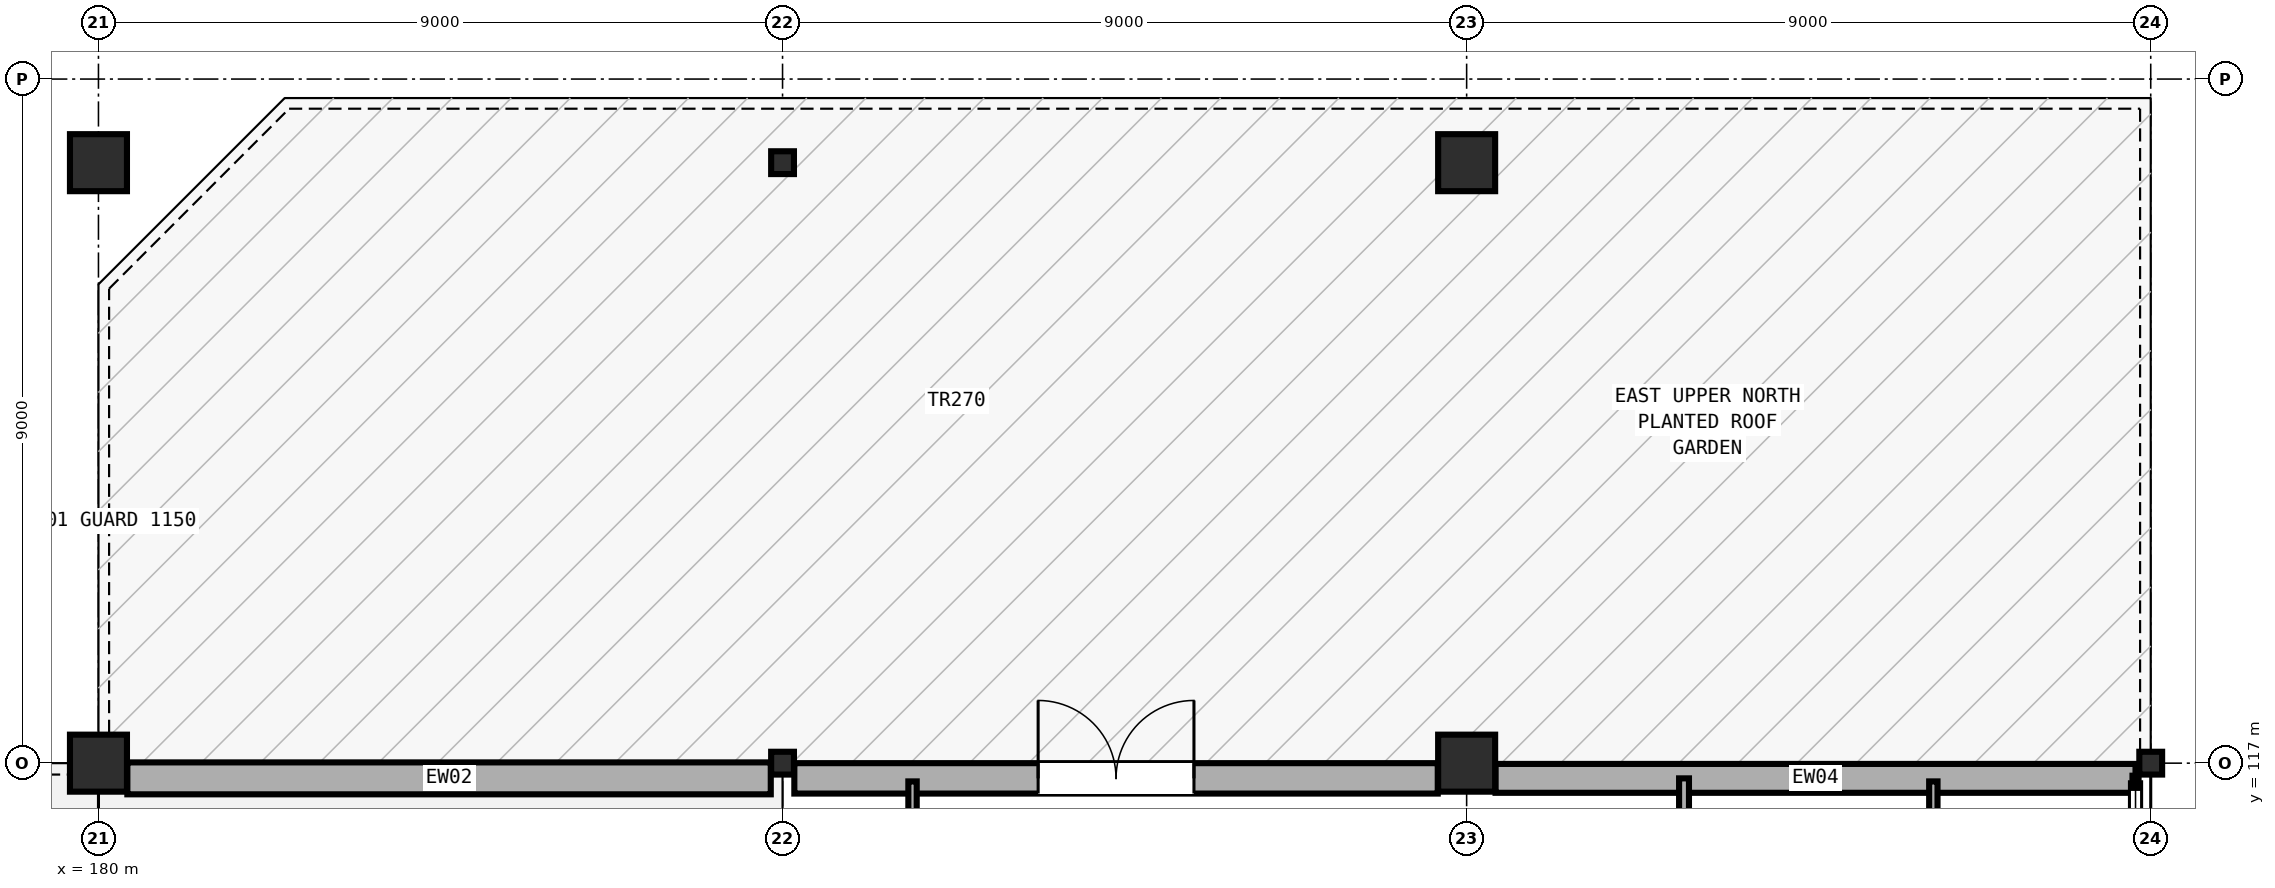
"""IFC4 building model, lengths in metres.
Left out: names, types, materials, properties, quantities, classifications, styles, units other than length and angle.
Written with IfcOpenShell. Run it as: python <this file> out.ifc"""

import sys

from ifc_helpers import new_model, si_unit, direction, frame, frame_2d, origin, origin_2d, place, context, subcontext, project, spatial, rectangle, hollow_rectangle, extrude, element, fill, save


model = new_model("IFC4")
c1 = context("Model", 3, precision=1e-05, world=origin(), true_north=direction((0.0, 1.0)))
c2 = subcontext(c1, "Body", "Model", "MODEL_VIEW")
j1 = project(units=[si_unit("LENGTHUNIT", "METRE"), si_unit("PLANEANGLEUNIT", "RADIAN")], contexts=[c1])
p1 = place(None, origin())
s1 = spatial("IfcSite", under=j1, at=p1, CompositionType="ELEMENT")
p2 = place(p1, origin())
s2 = spatial("IfcBuilding", under=s1, at=p2, CompositionType="ELEMENT")
p3 = place(p2, frame((0.0, 0.0, 19.2)))
s3 = spatial("IfcBuildingStorey", under=s2, at=p3, CompositionType="ELEMENT", Elevation=19.2)
for number, where, z_axis, x_axis in (
    (1, (180.0, 117.0, 0.0), (0.0, 0.0, 1.0), (1.0, 0.0, 0.0)),
    (2, (180.0, 124.9, 0.0), (0.0, 0.0, 1.0), (1.0, 0.0, 0.0)),
):
    element("IfcColumn", number, at=place(p3, frame(where, z_axis=z_axis, x_axis=x_axis)), inside=s3, PredefinedType="COLUMN", context=c2, shape_type="SweptSolid", body=[
        extrude(rectangle(XDim=0.75, YDim=0.75, at=origin_2d()), origin(), (0.0, 0.0, 1.0), 4.8),
    ])
for number, where, z_axis, x_axis in (
    (3, (189.0, 117.0, 0.0), (0.0, 0.0, 1.0), (1.0, 0.0, 0.0)),
    (4, (189.0, 124.9, 0.0), (0.0, 0.0, 1.0), (1.0, 0.0, 0.0)),
):
    element("IfcColumn", number, at=place(p3, frame(where, z_axis=z_axis, x_axis=x_axis)), inside=s3, PredefinedType="COLUMN", context=c2, shape_type="SweptSolid", body=[
        extrude(hollow_rectangle(XDim=0.3, YDim=0.3, WallThickness=0.012, at=origin_2d()), origin(), (0.0, 0.0, 1.0), 4.8),
    ])
for number, where, z_axis, x_axis in (
    (5, (198.0, 117.0, 0.0), (0.0, 0.0, 1.0), (1.0, 0.0, 0.0)),
    (6, (198.0, 124.9, 0.0), (0.0, 0.0, 1.0), (1.0, 0.0, 0.0)),
):
    element("IfcColumn", number, at=place(p3, frame(where, z_axis=z_axis, x_axis=x_axis)), inside=s3, PredefinedType="COLUMN", context=c2, shape_type="SweptSolid", body=[
        extrude(rectangle(XDim=0.75, YDim=0.75, at=origin_2d()), origin(), (0.0, 0.0, 1.0), 4.8),
    ])
p4 = place(p3, frame((207.0, 117.0, 0.0), z_axis=(0.0, 0.0, 1.0), x_axis=(1.0, 0.0, 0.0)))
e7 = element("IfcColumn", 7, at=p4, inside=s3, PredefinedType="COLUMN", context=c2, shape_type="SweptSolid", body=[
    extrude(hollow_rectangle(XDim=0.3, YDim=0.3, WallThickness=0.012, at=origin_2d()), origin(), (0.0, 0.0, 1.0), 4.8),
])
p5 = place(p3, frame((180.38, 116.8, 0.0), z_axis=(0.0, 0.0, 1.0), x_axis=(1.0, 0.0, 0.0)))
e8 = element("IfcWall", 8, at=p5, inside=s3, PredefinedType="SOLIDWALL", context=c2, shape_type="SweptSolid", body=[
    extrude(rectangle(XDim=8.465, YDim=0.42, at=frame_2d((4.232, 0.0))), origin(), (0.0, 0.0, 1.0), 3.28),
])
p6 = place(p3, frame((189.155, 116.8, 0.0), z_axis=(0.0, 0.0, 1.0), x_axis=(1.0, 0.0, 0.0)))
e9 = element("IfcWall", 9, at=p6, inside=s3, PredefinedType="SOLIDWALL", context=c2, shape_type="SweptSolid", body=[
    extrude(rectangle(XDim=8.465, YDim=0.4, at=frame_2d((4.232, 0.0))), origin(), (0.0, 0.0, 1.0), 3.58),
])
p7 = place(p6, frame((3.208, 0.0, 0.0)))
e10 = element("IfcOpeningElement", 10, at=p7, cuts=e9, PredefinedType="OPENING", context=c2, shape_type="SweptSolid", body=[
    extrude(rectangle(XDim=2.05, YDim=2.3, at=frame_2d((1.025, 1.15))), frame((0.0, 0.21, 0.0), z_axis=(0.0, -1.0, 0.0), x_axis=(1.0, 0.0, 0.0)), (0.0, 0.0, 1.0), 0.42),
])
p8 = place(p3, frame((198.38, 116.8, 0.0), z_axis=(0.0, 0.0, 1.0), x_axis=(1.0, 0.0, 0.0)))
e11 = element("IfcWall", 11, at=p8, inside=s3, PredefinedType="SOLIDWALL", context=c2, shape_type="SweptSolid", body=[
    extrude(rectangle(XDim=8.42, YDim=0.38, at=frame_2d((4.21, 0.0))), origin(), (0.0, 0.0, 1.0), 3.58),
])
p9 = place(p3, frame((200.86, 102.77, 0.0), z_axis=(0.0, 0.0, 1.0), x_axis=(0.0, 1.0, 0.0)))
e12 = element("IfcWall", 12, at=p9, inside=s3, PredefinedType="PARTITIONING", context=c2, shape_type="SweptSolid", body=[
    extrude(rectangle(XDim=14.03, YDim=0.13, at=frame_2d((7.015, 0.0))), origin(), (0.0, 0.0, 1.0), 3.28),
])
p10 = place(p9, frame((6.44, 0.0, 0.0)))
e13 = element("IfcOpeningElement", 13, at=p10, cuts=e12, PredefinedType="OPENING", context=c2, shape_type="SweptSolid", body=[
    extrude(rectangle(XDim=1.15, YDim=2.15, at=frame_2d((0.575, 1.075))), frame((0.0, 0.075, 0.0), z_axis=(0.0, -1.0, 0.0), x_axis=(1.0, 0.0, 0.0)), (0.0, 0.0, 1.0), 0.15),
])
p11 = place(p3, frame((190.71, 108.802, 0.0), z_axis=(0.0, 0.0, 1.0), x_axis=(0.0, 1.0, 0.0)))
e14 = element("IfcWall", 14, at=p11, inside=s3, PredefinedType="PARTITIONING", context=c2, shape_type="SweptSolid", body=[
    extrude(rectangle(XDim=7.958, YDim=0.11, at=frame_2d((3.979, 0.0))), origin(), (0.0, 0.0, 1.0), 3.28),
])
p12 = place(p3, frame((204.14, 102.81, 0.0), z_axis=(0.0, 0.0, 1.0), x_axis=(0.0, 1.0, 0.0)))
e15 = element("IfcWall", 15, at=p12, inside=s3, PredefinedType="PARTITIONING", context=c2, shape_type="SweptSolid", body=[
    extrude(rectangle(XDim=13.95, YDim=0.11, at=frame_2d((6.975, 0.0))), origin(), (0.0, 0.0, 1.0), 3.28),
])
p13 = place(p7, origin())
e16 = element("IfcDoor", 16, at=p13, inside=s3, OperationType="DOUBLE_DOOR_SINGLE_SWING", PredefinedType="DOOR", context=c2, shape_type="SweptSolid", body=[
    extrude(rectangle(XDim=2.05, YDim=2.3, at=frame_2d((1.025, 1.15))), frame((0.0, 0.025, 0.0), z_axis=(0.0, -1.0, 0.0), x_axis=(1.0, 0.0, 0.0)), (0.0, 0.0, 1.0), 0.05),
])
fill(e10, e16)
save(model, sys.argv[1])
